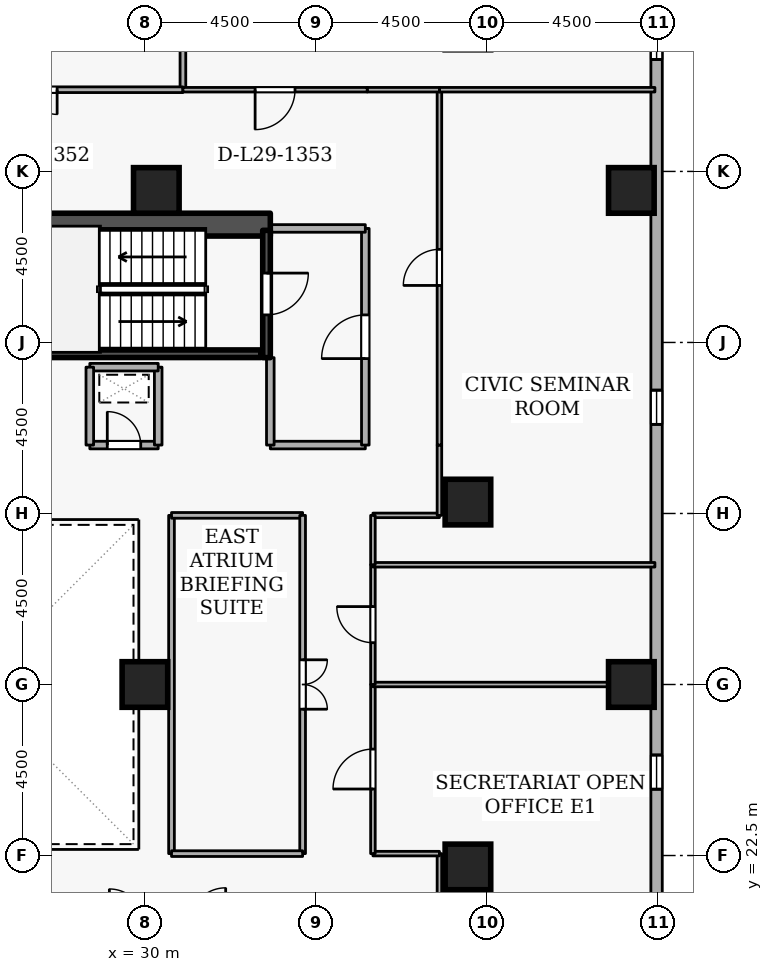
"""IFC4 building model, lengths in metres.
Left out: names, types, materials, properties, quantities, classifications, styles, units other than length and angle.
Written with IfcOpenShell. Run it as: python <this file> out.ifc"""

import sys

from ifc_helpers import new_model, si_unit, direction, frame, frame_2d, origin, origin_2d, place, context, subcontext, project, spatial, rectangle, extrude, element, fill, save


model = new_model("IFC4")
c1 = context("Model", 3, precision=1e-05, world=origin(), true_north=direction((0.0, 1.0)))
c2 = subcontext(c1, "Body", "Model", "MODEL_VIEW")
j1 = project(units=[si_unit("LENGTHUNIT", "METRE"), si_unit("PLANEANGLEUNIT", "RADIAN")], contexts=[c1])
p1 = place(None, origin())
s1 = spatial("IfcSite", under=j1, at=p1, CompositionType="ELEMENT")
p2 = place(p1, origin())
s2 = spatial("IfcBuilding", under=s1, at=p2, CompositionType="ELEMENT")
p3 = place(p2, frame((0.0, 0.0, 112.5)))
s3 = spatial("IfcBuildingStorey", under=s2, at=p3, CompositionType="ELEMENT", Elevation=112.5)
p4 = place(p3, frame((17.7, 39.1, 0.0), z_axis=(0.0, 0.0, 1.0), x_axis=(1.0, 0.0, 0.0)))
e1 = element("IfcWall", 1, at=p4, inside=s3, PredefinedType="SHEAR", context=c2, shape_type="SweptSolid", body=[
    extrude(rectangle(XDim=15.6, YDim=0.6, at=frame_2d((7.8, 0.0))), origin(), (0.0, 0.0, 1.0), 3.6),
])
for number, where, z_axis, x_axis in (
    (2, (42.8, 27.0, 0.0), (0.0, 0.0, 1.0), (1.0, 0.0, 0.0)),
    (3, (42.8, 40.0, 0.0), (0.0, 0.0, 1.0), (1.0, 0.0, 0.0)),
    (4, (38.5, 22.2, 0.0), (0.0, 0.0, 1.0), (1.0, 0.0, 0.0)),
    (5, (38.5, 31.8, 0.0), (0.0, 0.0, 1.0), (1.0, 0.0, 0.0)),
    (6, (30.3, 40.0, 0.0), (0.0, 0.0, 1.0), (1.0, 0.0, 0.0)),
    (7, (30.0, 27.0, 0.0), (0.0, 0.0, 1.0), (1.0, 0.0, 0.0)),
):
    element("IfcColumn", number, at=place(p3, frame(where, z_axis=z_axis, x_axis=x_axis)), inside=s3, PredefinedType="COLUMN", context=c2, shape_type="SweptSolid", body=[
        extrude(rectangle(XDim=1.2, YDim=1.2, at=origin_2d()), origin(), (0.0, 0.0, 1.0), 3.6),
    ])
p5 = place(p3, frame((43.464, 11.945, 0.0), z_axis=(0.0, 0.0, 1.0), x_axis=(2.6801568e-05, 0.999999999641, 0.0)))
e8 = element("IfcWall", 8, at=p5, inside=s3, PredefinedType="STANDARD", context=c2, shape_type="SweptSolid", body=[
    extrude(rectangle(XDim=36.437, YDim=0.3, at=frame_2d((18.218, 0.0))), origin(), (0.0, 0.0, 1.0), 2.7),
])
p6 = place(p5, frame((7.5, 0.0, 0.72)))
e9 = element("IfcOpeningElement", 9, at=p6, cuts=e8, PredefinedType="OPENING", context=c2, shape_type="SweptSolid", body=[
    extrude(rectangle(XDim=0.9, YDim=1.75, at=frame_2d((0.45, 0.875))), frame((0.0, 0.16, 0.0), z_axis=(0.0, -1.0, 0.0), x_axis=(1.0, 0.0, 0.0)), (0.0, 0.0, 1.0), 0.32),
])
p7 = place(p5, frame((12.3, 0.0, 0.72)))
e10 = element("IfcOpeningElement", 10, at=p7, cuts=e8, PredefinedType="OPENING", context=c2, shape_type="SweptSolid", body=[
    extrude(rectangle(XDim=0.9, YDim=1.75, at=frame_2d((0.45, 0.875))), frame((0.0, 0.16, 0.0), z_axis=(0.0, -1.0, 0.0), x_axis=(1.0, 0.0, 0.0)), (0.0, 0.0, 1.0), 0.32),
])
p8 = place(p5, frame((21.9, 0.0, 0.72)))
e11 = element("IfcOpeningElement", 11, at=p8, cuts=e8, PredefinedType="OPENING", context=c2, shape_type="SweptSolid", body=[
    extrude(rectangle(XDim=0.9, YDim=1.75, at=frame_2d((0.45, 0.875))), frame((0.0, 0.16, 0.0), z_axis=(0.0, -1.0, 0.0), x_axis=(1.0, 0.0, 0.0)), (0.0, 0.0, 1.0), 0.32),
])
p9 = place(p5, frame((31.5, 0.0, 0.72)))
e12 = element("IfcOpeningElement", 12, at=p9, cuts=e8, PredefinedType="OPENING", context=c2, shape_type="SweptSolid", body=[
    extrude(rectangle(XDim=0.9, YDim=1.75, at=frame_2d((0.45, 0.875))), frame((0.0, 0.16, 0.0), z_axis=(0.0, -1.0, 0.0), x_axis=(1.0, 0.0, 0.0)), (0.0, 0.0, 1.0), 0.32),
])
p10 = place(p3, frame((33.2, 38.95, 0.0), z_axis=(0.0, 0.0, 1.0), x_axis=(0.0, -1.0, 0.0)))
e13 = element("IfcWall", 13, at=p10, inside=s3, PredefinedType="SHEAR", context=c2, shape_type="SweptSolid", body=[
    extrude(rectangle(XDim=3.35, YDim=0.2, at=frame_2d((1.675, 0.0))), origin(), (0.0, 0.0, 1.0), 3.6),
])
p11 = place(p10, frame((1.125, 0.0, 0.0)))
e14 = element("IfcOpeningElement", 14, at=p11, cuts=e13, PredefinedType="OPENING", context=c2, shape_type="SweptSolid", body=[
    extrude(rectangle(XDim=1.1, YDim=2.1, at=frame_2d((0.55, 1.05))), frame((0.0, 0.11, 0.0), z_axis=(0.0, -1.0, 0.0), x_axis=(1.0, 0.0, 0.0)), (0.0, 0.0, 1.0), 0.22),
])
p12 = place(p3, frame((25.95, 35.703, 0.0), z_axis=(0.0, 0.0, 1.0), x_axis=(1.0, 0.0, 0.0)))
e15 = element("IfcWall", 15, at=p12, inside=s3, PredefinedType="SHEAR", context=c2, shape_type="SweptSolid", body=[
    extrude(rectangle(XDim=7.1, YDim=0.2, at=frame_2d((3.55, 0.0))), origin(), (0.0, 0.0, 1.0), 3.6),
])
p13 = place(p3, frame((33.3, 33.3, 0.0), z_axis=(0.0, 0.0, 1.0), x_axis=(1.0, 0.0, 0.0)))
e16 = element("IfcWall", 16, at=p13, inside=s3, PredefinedType="STANDARD", context=c2, shape_type="SweptSolid", body=[
    extrude(rectangle(XDim=2.5, YDim=0.2, at=frame_2d((1.25, 0.0))), origin(), (0.0, 0.0, 1.0), 3.34),
])
p14 = place(p3, frame((35.8, 33.3, 0.0), z_axis=(0.0, 0.0, 1.0), x_axis=(0.0, 1.0, 0.0)))
e17 = element("IfcWall", 17, at=p14, inside=s3, PredefinedType="STANDARD", context=c2, shape_type="SweptSolid", body=[
    extrude(rectangle(XDim=5.7, YDim=0.2, at=frame_2d((2.85, 0.0))), origin(), (0.0, 0.0, 1.0), 3.34),
])
p15 = place(p14, frame((2.275, 0.0, 0.0)))
e18 = element("IfcOpeningElement", 18, at=p15, cuts=e17, PredefinedType="OPENING", context=c2, shape_type="SweptSolid", body=[
    extrude(rectangle(XDim=1.15, YDim=2.1, at=frame_2d((0.575, 1.05))), frame((0.0, 0.11, 0.0), z_axis=(0.0, -1.0, 0.0), x_axis=(1.0, 0.0, 0.0)), (0.0, 0.0, 1.0), 0.22),
])
p16 = place(p3, frame((35.8, 39.0, 0.0), z_axis=(0.0, 0.0, 1.0), x_axis=(-1.0, 0.0, 0.0)))
e19 = element("IfcWall", 19, at=p16, inside=s3, PredefinedType="STANDARD", context=c2, shape_type="SweptSolid", body=[
    extrude(rectangle(XDim=2.5, YDim=0.2, at=frame_2d((1.25, 0.0))), origin(), (0.0, 0.0, 1.0), 3.34),
])
p17 = place(p3, frame((33.3, 35.6, 0.0), z_axis=(0.0, 0.0, 1.0), x_axis=(0.0, -1.0, 0.0)))
e20 = element("IfcWall", 20, at=p17, inside=s3, PredefinedType="STANDARD", context=c2, shape_type="SweptSolid", body=[
    extrude(rectangle(XDim=2.3, YDim=0.2, at=frame_2d((1.15, 0.0))), origin(), (0.0, 0.0, 1.0), 2.545),
])
p18 = place(p3, frame((28.55, 33.3, 0.0), z_axis=(0.0, 0.0, 1.0), x_axis=(1.0, 0.0, 0.0)))
e21 = element("IfcWall", 21, at=p18, inside=s3, PredefinedType="STANDARD", context=c2, shape_type="SweptSolid", body=[
    extrude(rectangle(XDim=1.8, YDim=0.2, at=frame_2d((0.9, 0.0))), origin(), (0.0, 0.0, 1.0), 3.34),
])
p19 = place(p18, frame((0.46, 0.0, 0.0)))
e22 = element("IfcOpeningElement", 22, at=p19, cuts=e21, PredefinedType="OPENING", context=c2, shape_type="SweptSolid", body=[
    extrude(rectangle(XDim=0.88, YDim=2.04, at=frame_2d((0.44, 1.02))), frame((0.0, 0.11, 0.0), z_axis=(0.0, -1.0, 0.0), x_axis=(1.0, 0.0, 0.0)), (0.0, 0.0, 1.0), 0.22),
])
p20 = place(p3, frame((30.35, 33.3, 0.0), z_axis=(0.0, 0.0, 1.0), x_axis=(0.0, 1.0, 0.0)))
e23 = element("IfcWall", 23, at=p20, inside=s3, PredefinedType="STANDARD", context=c2, shape_type="SweptSolid", body=[
    extrude(rectangle(XDim=2.05, YDim=0.2, at=frame_2d((1.025, 0.0))), origin(), (0.0, 0.0, 1.0), 3.34),
])
p21 = place(p3, frame((30.35, 35.35, 0.0), z_axis=(0.0, 0.0, 1.0), x_axis=(-1.0, 0.0, 0.0)))
e24 = element("IfcWall", 24, at=p21, inside=s3, PredefinedType="STANDARD", context=c2, shape_type="SweptSolid", body=[
    extrude(rectangle(XDim=1.8, YDim=0.2, at=frame_2d((0.9, 0.0))), origin(), (0.0, 0.0, 1.0), 3.34),
])
p22 = place(p3, frame((28.55, 35.35, 0.0), z_axis=(0.0, 0.0, 1.0), x_axis=(0.0, -1.0, 0.0)))
e25 = element("IfcWall", 25, at=p22, inside=s3, PredefinedType="STANDARD", context=c2, shape_type="SweptSolid", body=[
    extrude(rectangle(XDim=2.05, YDim=0.2, at=frame_2d((1.025, 0.0))), origin(), (0.0, 0.0, 1.0), 3.34),
])
p23 = place(p3, frame((37.75, 20.7, 0.0), z_axis=(0.0, 0.0, 1.0), x_axis=(0.0, 1.0, 0.0)))
e26 = element("IfcWall", 26, at=p23, inside=s3, PredefinedType="PARTITIONING", context=c2, shape_type="SweptSolid", body=[
    extrude(rectangle(XDim=1.85, YDim=0.12, at=frame_2d((0.925, 0.0))), origin(), (0.0, 0.0, 1.0), 3.34),
])
p24 = place(p3, frame((37.75, 22.55, 0.0), z_axis=(0.0, 0.0, 1.0), x_axis=(-1.0, 0.0, 0.0)))
e27 = element("IfcWall", 27, at=p24, inside=s3, PredefinedType="PARTITIONING", context=c2, shape_type="SweptSolid", body=[
    extrude(rectangle(XDim=1.75, YDim=0.12, at=frame_2d((0.875, 0.0))), origin(), (0.0, 0.0, 1.0), 3.34),
])
p25 = place(p3, frame((36.0, 22.55, 0.0), z_axis=(0.0, 0.0, 1.0), x_axis=(0.0, 1.0, 0.0)))
e28 = element("IfcWall", 28, at=p25, inside=s3, PredefinedType="PARTITIONING", context=c2, shape_type="SweptSolid", body=[
    extrude(rectangle(XDim=4.45, YDim=0.12, at=frame_2d((2.225, 0.0))), origin(), (0.0, 0.0, 1.0), 3.34),
])
p26 = place(p25, frame((1.7, 0.0, 0.0)))
e29 = element("IfcOpeningElement", 29, at=p26, cuts=e28, PredefinedType="OPENING", context=c2, shape_type="SweptSolid", body=[
    extrude(rectangle(XDim=1.05, YDim=2.1, at=frame_2d((0.525, 1.05))), frame((0.0, 0.07, 0.0), z_axis=(0.0, -1.0, 0.0), x_axis=(1.0, 0.0, 0.0)), (0.0, 0.0, 1.0), 0.14),
])
p27 = place(p3, frame((36.0, 27.0, 0.0), z_axis=(0.0, 0.0, 1.0), x_axis=(1.0, 0.0, 0.0)))
e30 = element("IfcWall", 30, at=p27, inside=s3, PredefinedType="PARTITIONING", context=c2, shape_type="SweptSolid", body=[
    extrude(rectangle(XDim=7.42, YDim=0.12, at=frame_2d((3.71, 0.0))), origin(), (0.0, 0.0, 1.0), 2.882),
])
p28 = place(p3, frame((36.0, 27.0, 0.0), z_axis=(0.0, 0.0, 1.0), x_axis=(0.0, 1.0, 0.0)))
e31 = element("IfcWall", 31, at=p28, inside=s3, PredefinedType="PARTITIONING", context=c2, shape_type="SweptSolid", body=[
    extrude(rectangle(XDim=3.15, YDim=0.12, at=frame_2d((1.575, 0.0))), origin(), (0.0, 0.0, 1.0), 3.34),
])
p29 = place(p28, frame((1.1, 0.0, 0.0)))
e32 = element("IfcOpeningElement", 32, at=p29, cuts=e31, PredefinedType="OPENING", context=c2, shape_type="SweptSolid", body=[
    extrude(rectangle(XDim=0.95, YDim=2.1, at=frame_2d((0.475, 1.05))), frame((0.0, 0.07, 0.0), z_axis=(0.0, -1.0, 0.0), x_axis=(1.0, 0.0, 0.0)), (0.0, 0.0, 1.0), 0.14),
])
p30 = place(p3, frame((36.0, 30.15, 0.0), z_axis=(0.0, 0.0, 1.0), x_axis=(1.0, 0.0, 0.0)))
e33 = element("IfcWall", 33, at=p30, inside=s3, PredefinedType="PARTITIONING", context=c2, shape_type="SweptSolid", body=[
    extrude(rectangle(XDim=7.42, YDim=0.12, at=frame_2d((3.71, 0.0))), origin(), (0.0, 0.0, 1.0), 3.34),
])
p31 = place(p3, frame((36.0, 31.45, 0.0), z_axis=(0.0, 0.0, 1.0), x_axis=(1.0, 0.0, 0.0)))
e34 = element("IfcWall", 34, at=p31, inside=s3, PredefinedType="PARTITIONING", context=c2, shape_type="SweptSolid", body=[
    extrude(rectangle(XDim=1.75, YDim=0.12, at=frame_2d((0.875, 0.0))), origin(), (0.0, 0.0, 1.0), 3.34),
])
p32 = place(p3, frame((37.75, 31.45, 0.0), z_axis=(0.0, 0.0, 1.0), x_axis=(0.0, 1.0, 0.0)))
e35 = element("IfcWall", 35, at=p32, inside=s3, PredefinedType="PARTITIONING", context=c2, shape_type="SweptSolid", body=[
    extrude(rectangle(XDim=1.85, YDim=0.12, at=frame_2d((0.925, 0.0))), origin(), (0.0, 0.0, 1.0), 3.34),
])
p33 = place(p3, frame((37.75, 33.3, 0.0), z_axis=(0.0, 0.0, 1.0), x_axis=(0.0, 1.0, 0.0)))
e36 = element("IfcWall", 36, at=p33, inside=s3, PredefinedType="PARTITIONING", context=c2, shape_type="SweptSolid", body=[
    extrude(rectangle(XDim=9.35, YDim=0.12, at=frame_2d((4.675, 0.0))), origin(), (0.0, 0.0, 1.0), 3.34),
])
p34 = place(p33, frame((4.2, 0.0, 0.0)))
e37 = element("IfcOpeningElement", 37, at=p34, cuts=e36, PredefinedType="OPENING", context=c2, shape_type="SweptSolid", body=[
    extrude(rectangle(XDim=0.95, YDim=2.1, at=frame_2d((0.475, 1.05))), frame((0.0, 0.07, 0.0), z_axis=(0.0, -1.0, 0.0), x_axis=(1.0, 0.0, 0.0)), (0.0, 0.0, 1.0), 0.14),
])
p35 = place(p3, frame((37.75, 42.65, 0.0), z_axis=(0.0, 0.0, 1.0), x_axis=(1.0, 0.0, 0.0)))
e38 = element("IfcWall", 38, at=p35, inside=s3, PredefinedType="PARTITIONING", context=c2, shape_type="SweptSolid", body=[
    extrude(rectangle(XDim=5.67, YDim=0.12, at=frame_2d((2.835, 0.0))), origin(), (0.0, 0.0, 1.0), 3.34),
])
p36 = place(p3, frame((36.0, 30.15, 0.0), z_axis=(0.0, 0.0, 1.0), x_axis=(0.0, 1.0, 0.0)))
e39 = element("IfcWall", 39, at=p36, inside=s3, PredefinedType="PARTITIONING", context=c2, shape_type="SweptSolid", body=[
    extrude(rectangle(XDim=1.3, YDim=0.12, at=frame_2d((0.65, 0.0))), origin(), (0.0, 0.0, 1.0), 3.34),
])
p37 = place(p3, frame((30.7, 22.55, 0.0), z_axis=(0.0, 0.0, 1.0), x_axis=(0.0, 1.0, 0.0)))
e40 = element("IfcWall", 40, at=p37, inside=s3, PredefinedType="PARTITIONING", context=c2, shape_type="SweptSolid", body=[
    extrude(rectangle(XDim=8.9, YDim=0.15, at=frame_2d((4.45, 0.0))), origin(), (0.0, 0.0, 1.0), 3.34),
])
p38 = place(p3, frame((30.7, 31.45, 0.0), z_axis=(0.0, 0.0, 1.0), x_axis=(1.0, 0.0, 0.0)))
e41 = element("IfcWall", 41, at=p38, inside=s3, PredefinedType="PARTITIONING", context=c2, shape_type="SweptSolid", body=[
    extrude(rectangle(XDim=3.45, YDim=0.15, at=frame_2d((1.725, 0.0))), origin(), (0.0, 0.0, 1.0), 3.34),
])
p39 = place(p3, frame((34.15, 31.45, 0.0), z_axis=(0.0, 0.0, 1.0), x_axis=(0.0, -1.0, 0.0)))
e42 = element("IfcWall", 42, at=p39, inside=s3, PredefinedType="PARTITIONING", context=c2, shape_type="SweptSolid", body=[
    extrude(rectangle(XDim=8.9, YDim=0.15, at=frame_2d((4.45, 0.0))), origin(), (0.0, 0.0, 1.0), 3.34),
])
p40 = place(p39, frame((3.8, 0.0, 0.0)))
e43 = element("IfcOpeningElement", 43, at=p40, cuts=e42, PredefinedType="OPENING", context=c2, shape_type="SweptSolid", body=[
    extrude(rectangle(XDim=1.3, YDim=2.12, at=frame_2d((0.65, 1.06))), frame((0.0, 0.085, 0.0), z_axis=(0.0, -1.0, 0.0), x_axis=(1.0, 0.0, 0.0)), (0.0, 0.0, 1.0), 0.17),
])
p41 = place(p3, frame((34.15, 22.55, 0.0), z_axis=(0.0, 0.0, 1.0), x_axis=(-1.0, 0.0, 0.0)))
e44 = element("IfcWall", 44, at=p41, inside=s3, PredefinedType="PARTITIONING", context=c2, shape_type="SweptSolid", body=[
    extrude(rectangle(XDim=3.45, YDim=0.15, at=frame_2d((1.725, 0.0))), origin(), (0.0, 0.0, 1.0), 3.34),
])
p42 = place(p3, frame((31.0, 50.92, 0.0), z_axis=(0.0, 0.0, 1.0), x_axis=(0.0, -1.0, 0.0)))
e45 = element("IfcWall", 45, at=p42, inside=s3, PredefinedType="PARTITIONING", context=c2, shape_type="SweptSolid", body=[
    extrude(rectangle(XDim=8.27, YDim=0.15, at=frame_2d((4.135, 0.0))), origin(), (0.0, 0.0, 1.0), 3.34),
])
p43 = place(p3, frame((31.0, 42.65, 0.0), z_axis=(0.0, 0.0, 1.0), x_axis=(-1.0, 0.0, 0.0)))
e46 = element("IfcWall", 46, at=p43, inside=s3, PredefinedType="PARTITIONING", context=c2, shape_type="SweptSolid", body=[
    extrude(rectangle(XDim=11.0, YDim=0.15, at=frame_2d((5.5, 0.0))), origin(), (0.0, 0.0, 1.0), 3.34),
])
p44 = place(p43, frame((3.31, 0.0, 0.0)))
e47 = element("IfcOpeningElement", 47, at=p44, cuts=e46, PredefinedType="OPENING", context=c2, shape_type="SweptSolid", body=[
    extrude(rectangle(XDim=1.3, YDim=2.12, at=frame_2d((0.65, 1.06))), frame((0.0, 0.085, 0.0), z_axis=(0.0, -1.0, 0.0), x_axis=(1.0, 0.0, 0.0)), (0.0, 0.0, 1.0), 0.17),
])
p45 = place(p3, frame((37.75, 42.65, 0.0), z_axis=(0.0, 0.0, 1.0), x_axis=(-1.0, 0.0, 0.0)))
e48 = element("IfcWall", 48, at=p45, inside=s3, PredefinedType="PARTITIONING", context=c2, shape_type="SweptSolid", body=[
    extrude(rectangle(XDim=1.9, YDim=0.12, at=frame_2d((0.95, 0.0))), origin(), (0.0, 0.0, 1.0), 3.34),
])
p46 = place(p3, frame((35.85, 42.65, 0.0), z_axis=(0.0, 0.0, 1.0), x_axis=(-1.0, 0.0, 0.0)))
e49 = element("IfcWall", 49, at=p46, inside=s3, PredefinedType="PARTITIONING", context=c2, shape_type="SweptSolid", body=[
    extrude(rectangle(XDim=4.85, YDim=0.12, at=frame_2d((2.425, 0.0))), origin(), (0.0, 0.0, 1.0), 2.895),
])
p47 = place(p46, frame((1.9, 0.0, 0.0)))
e50 = element("IfcOpeningElement", 50, at=p47, cuts=e49, PredefinedType="OPENING", context=c2, shape_type="SweptSolid", body=[
    extrude(rectangle(XDim=1.05, YDim=2.1, at=frame_2d((0.525, 1.05))), frame((0.0, 0.07, 0.0), z_axis=(0.0, -1.0, 0.0), x_axis=(1.0, 0.0, 0.0)), (0.0, 0.0, 1.0), 0.14),
])
p48 = place(p7, origin())
e51 = element("IfcWindow", 51, at=p48, inside=s3, PartitioningType="SINGLE_PANEL", PredefinedType="WINDOW", context=c2, shape_type="SweptSolid", body=[
    extrude(rectangle(XDim=0.9, YDim=1.75, at=frame_2d((0.45, 0.875))), frame((0.0, 0.03, 0.0), z_axis=(0.0, -1.0, 0.0), x_axis=(1.0, 0.0, 0.0)), (0.0, 0.0, 1.0), 0.06),
])
fill(e10, e51)
p49 = place(p8, origin())
e52 = element("IfcWindow", 52, at=p49, inside=s3, PartitioningType="SINGLE_PANEL", PredefinedType="WINDOW", context=c2, shape_type="SweptSolid", body=[
    extrude(rectangle(XDim=0.9, YDim=1.75, at=frame_2d((0.45, 0.875))), frame((0.0, 0.03, 0.0), z_axis=(0.0, -1.0, 0.0), x_axis=(1.0, 0.0, 0.0)), (0.0, 0.0, 1.0), 0.06),
])
fill(e11, e52)
p50 = place(p9, origin())
e53 = element("IfcWindow", 53, at=p50, inside=s3, PartitioningType="SINGLE_PANEL", PredefinedType="WINDOW", context=c2, shape_type="SweptSolid", body=[
    extrude(rectangle(XDim=0.9, YDim=1.75, at=frame_2d((0.45, 0.875))), frame((0.0, 0.03, 0.0), z_axis=(0.0, -1.0, 0.0), x_axis=(1.0, 0.0, 0.0)), (0.0, 0.0, 1.0), 0.06),
])
fill(e12, e53)
p51 = place(p11, origin())
e54 = element("IfcDoor", 54, at=p51, inside=s3, OperationType="SINGLE_SWING_LEFT", PredefinedType="DOOR", context=c2, shape_type="SweptSolid", body=[
    extrude(rectangle(XDim=1.1, YDim=2.1, at=frame_2d((0.55, 1.05))), frame((0.0, 0.025, 0.0), z_axis=(0.0, -1.0, 0.0), x_axis=(1.0, 0.0, 0.0)), (0.0, 0.0, 1.0), 0.05),
])
fill(e14, e54)
p52 = place(p15, origin())
e55 = element("IfcDoor", 55, at=p52, inside=s3, OperationType="SINGLE_SWING_LEFT", PredefinedType="DOOR", context=c2, shape_type="SweptSolid", body=[
    extrude(rectangle(XDim=1.15, YDim=2.1, at=frame_2d((0.575, 1.05))), frame((0.0, 0.025, 0.0), z_axis=(0.0, -1.0, 0.0), x_axis=(1.0, 0.0, 0.0)), (0.0, 0.0, 1.0), 0.05),
])
fill(e18, e55)
p53 = place(p19, origin())
e56 = element("IfcDoor", 56, at=p53, inside=s3, OperationType="SINGLE_SWING_LEFT", PredefinedType="DOOR", context=c2, shape_type="SweptSolid", body=[
    extrude(rectangle(XDim=0.88, YDim=2.04, at=frame_2d((0.44, 1.02))), frame((0.0, 0.025, 0.0), z_axis=(0.0, -1.0, 0.0), x_axis=(1.0, 0.0, 0.0)), (0.0, 0.0, 1.0), 0.05),
])
fill(e22, e56)
p54 = place(p26, origin())
e57 = element("IfcDoor", 57, at=p54, inside=s3, OperationType="SINGLE_SWING_LEFT", PredefinedType="DOOR", context=c2, shape_type="SweptSolid", body=[
    extrude(rectangle(XDim=1.05, YDim=2.1, at=frame_2d((0.525, 1.05))), frame((0.0, 0.025, 0.0), z_axis=(0.0, -1.0, 0.0), x_axis=(1.0, 0.0, 0.0)), (0.0, 0.0, 1.0), 0.05),
])
fill(e29, e57)
p55 = place(p29, origin())
e58 = element("IfcDoor", 58, at=p55, inside=s3, OperationType="SINGLE_SWING_RIGHT", PredefinedType="DOOR", context=c2, shape_type="SweptSolid", body=[
    extrude(rectangle(XDim=0.95, YDim=2.1, at=frame_2d((0.475, 1.05))), frame((0.0, 0.025, 0.0), z_axis=(0.0, -1.0, 0.0), x_axis=(1.0, 0.0, 0.0)), (0.0, 0.0, 1.0), 0.05),
])
fill(e32, e58)
p56 = place(p34, origin())
e59 = element("IfcDoor", 59, at=p56, inside=s3, OperationType="SINGLE_SWING_LEFT", PredefinedType="DOOR", context=c2, shape_type="SweptSolid", body=[
    extrude(rectangle(XDim=0.95, YDim=2.1, at=frame_2d((0.475, 1.05))), frame((0.0, 0.025, 0.0), z_axis=(0.0, -1.0, 0.0), x_axis=(1.0, 0.0, 0.0)), (0.0, 0.0, 1.0), 0.05),
])
fill(e37, e59)
p57 = place(p40, origin())
e60 = element("IfcDoor", 60, at=p57, inside=s3, OperationType="DOUBLE_DOOR_SINGLE_SWING", PredefinedType="DOOR", context=c2, shape_type="SweptSolid", body=[
    extrude(rectangle(XDim=1.3, YDim=2.12, at=frame_2d((0.65, 1.06))), frame((0.0, 0.025, 0.0), z_axis=(0.0, -1.0, 0.0), x_axis=(1.0, 0.0, 0.0)), (0.0, 0.0, 1.0), 0.05),
])
fill(e43, e60)
p58 = place(p44, origin())
e61 = element("IfcDoor", 61, at=p58, inside=s3, OperationType="DOUBLE_DOOR_SINGLE_SWING", PredefinedType="DOOR", context=c2, shape_type="SweptSolid", body=[
    extrude(rectangle(XDim=1.3, YDim=2.12, at=frame_2d((0.65, 1.06))), frame((0.0, 0.025, 0.0), z_axis=(0.0, -1.0, 0.0), x_axis=(1.0, 0.0, 0.0)), (0.0, 0.0, 1.0), 0.05),
])
fill(e47, e61)
p59 = place(p47, origin())
e62 = element("IfcDoor", 62, at=p59, inside=s3, OperationType="SINGLE_SWING_RIGHT", PredefinedType="DOOR", context=c2, shape_type="SweptSolid", body=[
    extrude(rectangle(XDim=1.05, YDim=2.1, at=frame_2d((0.525, 1.05))), frame((0.0, 0.025, 0.0), z_axis=(0.0, -1.0, 0.0), x_axis=(1.0, 0.0, 0.0)), (0.0, 0.0, 1.0), 0.05),
])
fill(e50, e62)
save(model, sys.argv[1])
